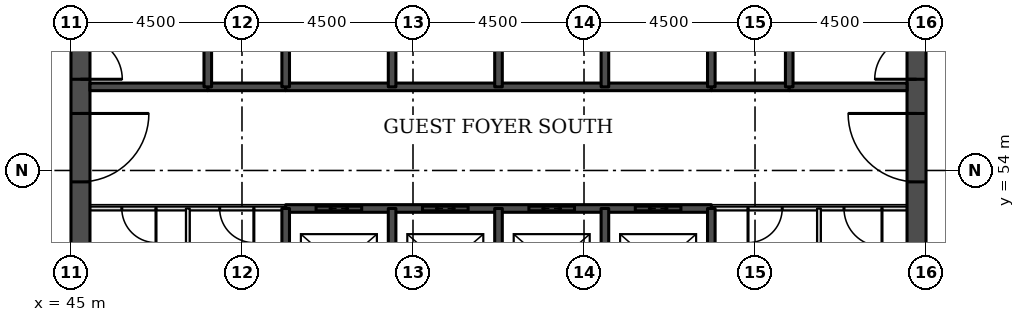
"""IFC4 building model, lengths in metres.
Left out: names, types, materials, properties, quantities, classifications, styles, units other than length and angle.
Written with IfcOpenShell. Run it as: python <this file> out.ifc"""

import sys

from ifc_helpers import new_model, si_unit, direction, frame, frame_2d, origin, place, context, subcontext, project, spatial, rectangle, extrude, element, fill, save


model = new_model("IFC4")
c1 = context("Model", 3, precision=1e-05, world=origin(), true_north=direction((0.0, 1.0)))
c2 = subcontext(c1, "Body", "Model", "MODEL_VIEW")
j1 = project(units=[si_unit("LENGTHUNIT", "METRE"), si_unit("PLANEANGLEUNIT", "RADIAN")], contexts=[c1])
p1 = place(None, origin())
s1 = spatial("IfcSite", under=j1, at=p1, CompositionType="ELEMENT")
p2 = place(p1, origin())
s2 = spatial("IfcBuilding", under=s1, at=p2, CompositionType="ELEMENT")
p3 = place(p2, frame((0.0, 0.0, 66.0)))
s3 = spatial("IfcBuildingStorey", under=s2, at=p3, CompositionType="ELEMENT", Elevation=66.0)
p4 = place(p3, frame((45.25, 49.5, 0.0), z_axis=(0.0, 0.0, 1.0), x_axis=(0.0, 1.0, 0.0)))
e1 = element("IfcWall", 1, at=p4, inside=s3, PredefinedType="SHEAR", context=c2, shape_type="SweptSolid", body=[
    extrude(rectangle(XDim=22.5, YDim=0.5, at=frame_2d((11.25, 0.0))), origin(), (0.0, 0.0, 1.0), 3.3),
])
p5 = place(p4, frame((4.2, 0.0, 0.0)))
e2 = element("IfcOpeningElement", 2, at=p5, cuts=e1, PredefinedType="OPENING", context=c2, shape_type="SweptSolid", body=[
    extrude(rectangle(XDim=1.8, YDim=2.1, at=frame_2d((0.9, 1.05))), frame((0.0, 0.26, 0.0), z_axis=(0.0, -1.0, 0.0), x_axis=(1.0, 0.0, 0.0)), (0.0, 0.0, 1.0), 0.52),
])
p6 = place(p4, frame((6.9, 0.0, 0.0)))
e3 = element("IfcOpeningElement", 3, at=p6, cuts=e1, PredefinedType="OPENING", context=c2, shape_type="SweptSolid", body=[
    extrude(rectangle(XDim=1.1, YDim=2.1, at=frame_2d((0.55, 1.05))), frame((0.0, 0.26, 0.0), z_axis=(0.0, -1.0, 0.0), x_axis=(1.0, 0.0, 0.0)), (0.0, 0.0, 1.0), 0.52),
])
p7 = place(p4, frame((13.6, 0.0, 0.0)))
e4 = element("IfcOpeningElement", 4, at=p7, cuts=e1, PredefinedType="OPENING", context=c2, shape_type="SweptSolid", body=[
    extrude(rectangle(XDim=1.1, YDim=2.1, at=frame_2d((0.55, 1.05))), frame((0.0, 0.26, 0.0), z_axis=(0.0, -1.0, 0.0), x_axis=(1.0, 0.0, 0.0)), (0.0, 0.0, 1.0), 0.52),
])
p8 = place(p4, frame((16.5, 0.0, 0.0)))
e5 = element("IfcOpeningElement", 5, at=p8, cuts=e1, PredefinedType="OPENING", context=c2, shape_type="SweptSolid", body=[
    extrude(rectangle(XDim=1.8, YDim=2.1, at=frame_2d((0.9, 1.05))), frame((0.0, 0.26, 0.0), z_axis=(0.0, -1.0, 0.0), x_axis=(1.0, 0.0, 0.0)), (0.0, 0.0, 1.0), 0.52),
])
p9 = place(p3, frame((67.25, 49.5, 0.0), z_axis=(0.0, 0.0, 1.0), x_axis=(0.0, 1.0, 0.0)))
e6 = element("IfcWall", 6, at=p9, inside=s3, PredefinedType="SHEAR", context=c2, shape_type="SweptSolid", body=[
    extrude(rectangle(XDim=22.5, YDim=0.5, at=frame_2d((11.25, 0.0))), origin(), (0.0, 0.0, 1.0), 3.3),
])
p10 = place(p9, frame((4.2, 0.0, 0.0)))
e7 = element("IfcOpeningElement", 7, at=p10, cuts=e6, PredefinedType="OPENING", context=c2, shape_type="SweptSolid", body=[
    extrude(rectangle(XDim=1.8, YDim=2.1, at=frame_2d((0.9, 1.05))), frame((0.0, 0.26, 0.0), z_axis=(0.0, -1.0, 0.0), x_axis=(1.0, 0.0, 0.0)), (0.0, 0.0, 1.0), 0.52),
])
p11 = place(p9, frame((6.9, 0.0, 0.0)))
e8 = element("IfcOpeningElement", 8, at=p11, cuts=e6, PredefinedType="OPENING", context=c2, shape_type="SweptSolid", body=[
    extrude(rectangle(XDim=1.1, YDim=2.1, at=frame_2d((0.55, 1.05))), frame((0.0, 0.26, 0.0), z_axis=(0.0, -1.0, 0.0), x_axis=(1.0, 0.0, 0.0)), (0.0, 0.0, 1.0), 0.52),
])
p12 = place(p9, frame((13.6, 0.0, 0.0)))
e9 = element("IfcOpeningElement", 9, at=p12, cuts=e6, PredefinedType="OPENING", context=c2, shape_type="SweptSolid", body=[
    extrude(rectangle(XDim=1.1, YDim=2.1, at=frame_2d((0.55, 1.05))), frame((0.0, 0.26, 0.0), z_axis=(0.0, -1.0, 0.0), x_axis=(1.0, 0.0, 0.0)), (0.0, 0.0, 1.0), 0.52),
])
p13 = place(p9, frame((16.5, 0.0, 0.0)))
e10 = element("IfcOpeningElement", 10, at=p13, cuts=e6, PredefinedType="OPENING", context=c2, shape_type="SweptSolid", body=[
    extrude(rectangle(XDim=1.8, YDim=2.1, at=frame_2d((0.9, 1.05))), frame((0.0, 0.26, 0.0), z_axis=(0.0, -1.0, 0.0), x_axis=(1.0, 0.0, 0.0)), (0.0, 0.0, 1.0), 0.52),
])
p14 = place(p3, frame((45.5, 53.0, 0.0), z_axis=(0.0, 0.0, 1.0), x_axis=(1.0, 0.0, 0.0)))
e11 = element("IfcWall", 11, at=p14, inside=s3, PredefinedType="PARTITIONING", context=c2, shape_type="SweptSolid", body=[
    extrude(rectangle(XDim=5.15, YDim=0.1, at=frame_2d((2.575, 0.0))), origin(), (0.0, 0.0, 1.0), 3.08),
])
p15 = place(p14, frame((0.837, 0.0, 0.0)))
e12 = element("IfcOpeningElement", 12, at=p15, cuts=e11, PredefinedType="OPENING", context=c2, shape_type="SweptSolid", body=[
    extrude(rectangle(XDim=0.9, YDim=2.1, at=frame_2d((0.45, 1.05))), frame((0.0, 0.06, 0.0), z_axis=(0.0, -1.0, 0.0), x_axis=(1.0, 0.0, 0.0)), (0.0, 0.0, 1.0), 0.12),
])
p16 = place(p14, frame((3.413, 0.0, 0.0)))
e13 = element("IfcOpeningElement", 13, at=p16, cuts=e11, PredefinedType="OPENING", context=c2, shape_type="SweptSolid", body=[
    extrude(rectangle(XDim=0.9, YDim=2.1, at=frame_2d((0.45, 1.05))), frame((0.0, 0.06, 0.0), z_axis=(0.0, -1.0, 0.0), x_axis=(1.0, 0.0, 0.0)), (0.0, 0.0, 1.0), 0.12),
])
p17 = place(p3, frame((61.85, 53.0, 0.0), z_axis=(0.0, 0.0, 1.0), x_axis=(1.0, 0.0, 0.0)))
e14 = element("IfcWall", 14, at=p17, inside=s3, PredefinedType="PARTITIONING", context=c2, shape_type="SweptSolid", body=[
    extrude(rectangle(XDim=5.15, YDim=0.1, at=frame_2d((2.575, 0.0))), origin(), (0.0, 0.0, 1.0), 3.08),
])
p18 = place(p17, frame((3.491, 0.0, 0.0)))
e15 = element("IfcOpeningElement", 15, at=p18, cuts=e14, PredefinedType="OPENING", context=c2, shape_type="SweptSolid", body=[
    extrude(rectangle(XDim=1.0, YDim=2.1, at=frame_2d((0.5, 1.05))), frame((0.0, 0.06, 0.0), z_axis=(0.0, -1.0, 0.0), x_axis=(1.0, 0.0, 0.0)), (0.0, 0.0, 1.0), 0.12),
])
p19 = place(p17, frame((0.966, 0.0, 0.0)))
e16 = element("IfcOpeningElement", 16, at=p19, cuts=e14, PredefinedType="OPENING", context=c2, shape_type="SweptSolid", body=[
    extrude(rectangle(XDim=0.9, YDim=2.1, at=frame_2d((0.45, 1.05))), frame((0.0, 0.06, 0.0), z_axis=(0.0, -1.0, 0.0), x_axis=(1.0, 0.0, 0.0)), (0.0, 0.0, 1.0), 0.12),
])
p20 = place(p3, frame((50.65, 53.0, 0.0), z_axis=(0.0, 0.0, 1.0), x_axis=(1.0, 0.0, 0.0)))
e17 = element("IfcWall", 17, at=p20, inside=s3, PredefinedType="SOLIDWALL", context=c2, shape_type="SweptSolid", body=[
    extrude(rectangle(XDim=11.2, YDim=0.2, at=frame_2d((5.6, 0.0))), origin(), (0.0, 0.0, 1.0), 3.08),
])
p21 = place(p20, frame((0.8, 0.0, 0.0)))
e18 = element("IfcOpeningElement", 18, at=p21, cuts=e17, PredefinedType="OPENING", context=c2, shape_type="SweptSolid", body=[
    extrude(rectangle(XDim=1.2, YDim=2.1, at=frame_2d((0.6, 1.05))), frame((0.0, 0.11, 0.0), z_axis=(0.0, -1.0, 0.0), x_axis=(1.0, 0.0, 0.0)), (0.0, 0.0, 1.0), 0.22),
])
p22 = place(p20, frame((3.6, 0.0, 0.0)))
e19 = element("IfcOpeningElement", 19, at=p22, cuts=e17, PredefinedType="OPENING", context=c2, shape_type="SweptSolid", body=[
    extrude(rectangle(XDim=1.2, YDim=2.1, at=frame_2d((0.6, 1.05))), frame((0.0, 0.11, 0.0), z_axis=(0.0, -1.0, 0.0), x_axis=(1.0, 0.0, 0.0)), (0.0, 0.0, 1.0), 0.22),
])
p23 = place(p20, frame((6.4, 0.0, 0.0)))
e20 = element("IfcOpeningElement", 20, at=p23, cuts=e17, PredefinedType="OPENING", context=c2, shape_type="SweptSolid", body=[
    extrude(rectangle(XDim=1.2, YDim=2.1, at=frame_2d((0.6, 1.05))), frame((0.0, 0.11, 0.0), z_axis=(0.0, -1.0, 0.0), x_axis=(1.0, 0.0, 0.0)), (0.0, 0.0, 1.0), 0.22),
])
p24 = place(p20, frame((9.2, 0.0, 0.0)))
e21 = element("IfcOpeningElement", 21, at=p24, cuts=e17, PredefinedType="OPENING", context=c2, shape_type="SweptSolid", body=[
    extrude(rectangle(XDim=1.2, YDim=2.1, at=frame_2d((0.6, 1.05))), frame((0.0, 0.11, 0.0), z_axis=(0.0, -1.0, 0.0), x_axis=(1.0, 0.0, 0.0)), (0.0, 0.0, 1.0), 0.22),
])
for number, where, z_axis, x_axis in (
    (22, (48.6, 56.2, 0.0), (0.0, 0.0, 1.0), (1.0, 0.0, 0.0)),
    (23, (61.85, 56.2, 0.0), (0.0, 0.0, 1.0), (1.0, 0.0, 0.0)),
):
    element("IfcWall", number, at=place(p3, frame(where, z_axis=z_axis, x_axis=x_axis)), inside=s3, PredefinedType="SOLIDWALL", context=c2, shape_type="SweptSolid", body=[
        extrude(rectangle(XDim=2.05, YDim=0.2, at=frame_2d((1.025, 0.0))), origin(), (0.0, 0.0, 1.0), 3.08),
    ])
p25 = place(p3, frame((45.5, 56.2, 0.0), z_axis=(0.0, 0.0, 1.0), x_axis=(1.0, 0.0, 0.0)))
e24 = element("IfcWall", 24, at=p25, inside=s3, PredefinedType="SOLIDWALL", context=c2, shape_type="SweptSolid", body=[
    extrude(rectangle(XDim=3.1, YDim=0.2, at=frame_2d((1.55, 0.0))), origin(), (0.0, 0.0, 1.0), 3.08),
])
p26 = place(p3, frame((50.65, 56.2, 0.0), z_axis=(0.0, 0.0, 1.0), x_axis=(1.0, 0.0, 0.0)))
e25 = element("IfcWall", 25, at=p26, inside=s3, PredefinedType="SOLIDWALL", context=c2, shape_type="SweptSolid", body=[
    extrude(rectangle(XDim=11.2, YDim=0.2, at=frame_2d((5.6, 0.0))), origin(), (0.0, 0.0, 1.0), 3.08),
])
p27 = place(p3, frame((63.9, 56.2, 0.0), z_axis=(0.0, 0.0, 1.0), x_axis=(1.0, 0.0, 0.0)))
e26 = element("IfcWall", 26, at=p27, inside=s3, PredefinedType="SOLIDWALL", context=c2, shape_type="SweptSolid", body=[
    extrude(rectangle(XDim=3.1, YDim=0.2, at=frame_2d((1.55, 0.0))), origin(), (0.0, 0.0, 1.0), 3.08),
])
p28 = place(p3, frame((48.075, 50.0, 0.0), z_axis=(0.0, 0.0, 1.0), x_axis=(0.0, 1.0, 0.0)))
e27 = element("IfcWall", 27, at=p28, inside=s3, PredefinedType="PARTITIONING", context=c2, shape_type="SweptSolid", body=[
    extrude(rectangle(XDim=3.0, YDim=0.1, at=frame_2d((1.5, 0.0))), origin(), (0.0, 0.0, 1.0), 3.08),
])
p29 = place(p3, frame((48.6, 56.2, 0.0), z_axis=(0.0, 0.0, 1.0), x_axis=(0.0, 1.0, 0.0)))
e28 = element("IfcWall", 28, at=p29, inside=s3, PredefinedType="SOLIDWALL", context=c2, shape_type="SweptSolid", body=[
    extrude(rectangle(XDim=5.8, YDim=0.2, at=frame_2d((2.9, 0.0))), origin(), (0.0, 0.0, 1.0), 3.08),
])
p30 = place(p3, frame((50.65, 50.0, 0.0), z_axis=(0.0, 0.0, 1.0), x_axis=(0.0, 1.0, 0.0)))
e29 = element("IfcWall", 29, at=p30, inside=s3, PredefinedType="SOLIDWALL", context=c2, shape_type="SweptSolid", body=[
    extrude(rectangle(XDim=3.0, YDim=0.2, at=frame_2d((1.5, 0.0))), origin(), (0.0, 0.0, 1.0), 3.08),
])
p31 = place(p3, frame((50.65, 56.2, 0.0), z_axis=(0.0, 0.0, 1.0), x_axis=(0.0, 1.0, 0.0)))
e30 = element("IfcWall", 30, at=p31, inside=s3, PredefinedType="SOLIDWALL", context=c2, shape_type="SweptSolid", body=[
    extrude(rectangle(XDim=2.8, YDim=0.2, at=frame_2d((1.4, 0.0))), origin(), (0.0, 0.0, 1.0), 3.08),
])
p32 = place(p3, frame((53.45, 50.0, 0.0), z_axis=(0.0, 0.0, 1.0), x_axis=(0.0, 1.0, 0.0)))
e31 = element("IfcWall", 31, at=p32, inside=s3, PredefinedType="SOLIDWALL", context=c2, shape_type="SweptSolid", body=[
    extrude(rectangle(XDim=3.0, YDim=0.2, at=frame_2d((1.5, 0.0))), origin(), (0.0, 0.0, 1.0), 3.08),
])
p33 = place(p3, frame((53.45, 56.2, 0.0), z_axis=(0.0, 0.0, 1.0), x_axis=(0.0, 1.0, 0.0)))
e32 = element("IfcWall", 32, at=p33, inside=s3, PredefinedType="SOLIDWALL", context=c2, shape_type="SweptSolid", body=[
    extrude(rectangle(XDim=2.8, YDim=0.2, at=frame_2d((1.4, 0.0))), origin(), (0.0, 0.0, 1.0), 3.08),
])
p34 = place(p3, frame((56.25, 50.0, 0.0), z_axis=(0.0, 0.0, 1.0), x_axis=(0.0, 1.0, 0.0)))
e33 = element("IfcWall", 33, at=p34, inside=s3, PredefinedType="SOLIDWALL", context=c2, shape_type="SweptSolid", body=[
    extrude(rectangle(XDim=3.0, YDim=0.2, at=frame_2d((1.5, 0.0))), origin(), (0.0, 0.0, 1.0), 3.08),
])
p35 = place(p3, frame((56.25, 56.2, 0.0), z_axis=(0.0, 0.0, 1.0), x_axis=(0.0, 1.0, 0.0)))
e34 = element("IfcWall", 34, at=p35, inside=s3, PredefinedType="SOLIDWALL", context=c2, shape_type="SweptSolid", body=[
    extrude(rectangle(XDim=2.8, YDim=0.2, at=frame_2d((1.4, 0.0))), origin(), (0.0, 0.0, 1.0), 3.08),
])
p36 = place(p3, frame((59.05, 50.0, 0.0), z_axis=(0.0, 0.0, 1.0), x_axis=(0.0, 1.0, 0.0)))
e35 = element("IfcWall", 35, at=p36, inside=s3, PredefinedType="SOLIDWALL", context=c2, shape_type="SweptSolid", body=[
    extrude(rectangle(XDim=3.0, YDim=0.2, at=frame_2d((1.5, 0.0))), origin(), (0.0, 0.0, 1.0), 3.08),
])
p37 = place(p3, frame((59.05, 56.2, 0.0), z_axis=(0.0, 0.0, 1.0), x_axis=(0.0, 1.0, 0.0)))
e36 = element("IfcWall", 36, at=p37, inside=s3, PredefinedType="SOLIDWALL", context=c2, shape_type="SweptSolid", body=[
    extrude(rectangle(XDim=2.8, YDim=0.2, at=frame_2d((1.4, 0.0))), origin(), (0.0, 0.0, 1.0), 3.08),
])
p38 = place(p3, frame((61.85, 50.0, 0.0), z_axis=(0.0, 0.0, 1.0), x_axis=(0.0, 1.0, 0.0)))
e37 = element("IfcWall", 37, at=p38, inside=s3, PredefinedType="SOLIDWALL", context=c2, shape_type="SweptSolid", body=[
    extrude(rectangle(XDim=3.0, YDim=0.2, at=frame_2d((1.5, 0.0))), origin(), (0.0, 0.0, 1.0), 3.08),
])
p39 = place(p3, frame((61.85, 56.2, 0.0), z_axis=(0.0, 0.0, 1.0), x_axis=(0.0, 1.0, 0.0)))
e38 = element("IfcWall", 38, at=p39, inside=s3, PredefinedType="SOLIDWALL", context=c2, shape_type="SweptSolid", body=[
    extrude(rectangle(XDim=2.8, YDim=0.2, at=frame_2d((1.4, 0.0))), origin(), (0.0, 0.0, 1.0), 3.08),
])
p40 = place(p3, frame((63.9, 56.2, 0.0), z_axis=(0.0, 0.0, 1.0), x_axis=(0.0, 1.0, 0.0)))
e39 = element("IfcWall", 39, at=p40, inside=s3, PredefinedType="SOLIDWALL", context=c2, shape_type="SweptSolid", body=[
    extrude(rectangle(XDim=5.8, YDim=0.2, at=frame_2d((2.9, 0.0))), origin(), (0.0, 0.0, 1.0), 3.08),
])
p41 = place(p3, frame((64.683, 50.0, 0.0), z_axis=(0.0, 0.0, 1.0), x_axis=(0.0, 1.0, 0.0)))
e40 = element("IfcWall", 40, at=p41, inside=s3, PredefinedType="PARTITIONING", context=c2, shape_type="SweptSolid", body=[
    extrude(rectangle(XDim=3.0, YDim=0.1, at=frame_2d((1.5, 0.0))), origin(), (0.0, 0.0, 1.0), 3.08),
])
p42 = place(p21, origin())
e41 = element("IfcDoor", 41, at=p42, inside=s3, OperationType="DOUBLE_DOOR_SLIDING", PredefinedType="DOOR", context=c2, shape_type="SweptSolid", body=[
    extrude(rectangle(XDim=1.2, YDim=2.1, at=frame_2d((0.6, 1.05))), frame((0.0, 0.025, 0.0), z_axis=(0.0, -1.0, 0.0), x_axis=(1.0, 0.0, 0.0)), (0.0, 0.0, 1.0), 0.05),
])
fill(e18, e41)
p43 = place(p22, origin())
e42 = element("IfcDoor", 42, at=p43, inside=s3, OperationType="DOUBLE_DOOR_SLIDING", PredefinedType="DOOR", context=c2, shape_type="SweptSolid", body=[
    extrude(rectangle(XDim=1.2, YDim=2.1, at=frame_2d((0.6, 1.05))), frame((0.0, 0.025, 0.0), z_axis=(0.0, -1.0, 0.0), x_axis=(1.0, 0.0, 0.0)), (0.0, 0.0, 1.0), 0.05),
])
fill(e19, e42)
p44 = place(p23, origin())
e43 = element("IfcDoor", 43, at=p44, inside=s3, OperationType="DOUBLE_DOOR_SLIDING", PredefinedType="DOOR", context=c2, shape_type="SweptSolid", body=[
    extrude(rectangle(XDim=1.2, YDim=2.1, at=frame_2d((0.6, 1.05))), frame((0.0, 0.025, 0.0), z_axis=(0.0, -1.0, 0.0), x_axis=(1.0, 0.0, 0.0)), (0.0, 0.0, 1.0), 0.05),
])
fill(e20, e43)
p45 = place(p24, origin())
e44 = element("IfcDoor", 44, at=p45, inside=s3, OperationType="DOUBLE_DOOR_SLIDING", PredefinedType="DOOR", context=c2, shape_type="SweptSolid", body=[
    extrude(rectangle(XDim=1.2, YDim=2.1, at=frame_2d((0.6, 1.05))), frame((0.0, 0.025, 0.0), z_axis=(0.0, -1.0, 0.0), x_axis=(1.0, 0.0, 0.0)), (0.0, 0.0, 1.0), 0.05),
])
fill(e21, e44)
p46 = place(p5, frame((1.8, 0.0, 0.0), z_axis=(0.0, 0.0, 1.0), x_axis=(-1.0, 0.0, 0.0)))
e45 = element("IfcDoor", 45, at=p46, inside=s3, OperationType="SINGLE_SWING_LEFT", PredefinedType="DOOR", context=c2, shape_type="SweptSolid", body=[
    extrude(rectangle(XDim=1.8, YDim=2.1, at=frame_2d((0.9, 1.05))), frame((0.0, 0.025, 0.0), z_axis=(0.0, -1.0, 0.0), x_axis=(1.0, 0.0, 0.0)), (0.0, 0.0, 1.0), 0.05),
])
fill(e2, e45)
p47 = place(p6, frame((1.1, 0.0, 0.0), z_axis=(0.0, 0.0, 1.0), x_axis=(-1.0, 0.0, 0.0)))
e46 = element("IfcDoor", 46, at=p47, inside=s3, OperationType="SINGLE_SWING_RIGHT", PredefinedType="DOOR", context=c2, shape_type="SweptSolid", body=[
    extrude(rectangle(XDim=1.1, YDim=2.1, at=frame_2d((0.55, 1.05))), frame((0.0, 0.025, 0.0), z_axis=(0.0, -1.0, 0.0), x_axis=(1.0, 0.0, 0.0)), (0.0, 0.0, 1.0), 0.05),
])
fill(e3, e46)
p48 = place(p10, origin())
e47 = element("IfcDoor", 47, at=p48, inside=s3, OperationType="SINGLE_SWING_RIGHT", PredefinedType="DOOR", context=c2, shape_type="SweptSolid", body=[
    extrude(rectangle(XDim=1.8, YDim=2.1, at=frame_2d((0.9, 1.05))), frame((0.0, 0.025, 0.0), z_axis=(0.0, -1.0, 0.0), x_axis=(1.0, 0.0, 0.0)), (0.0, 0.0, 1.0), 0.05),
])
fill(e7, e47)
p49 = place(p11, origin())
e48 = element("IfcDoor", 48, at=p49, inside=s3, OperationType="SINGLE_SWING_LEFT", PredefinedType="DOOR", context=c2, shape_type="SweptSolid", body=[
    extrude(rectangle(XDim=1.1, YDim=2.1, at=frame_2d((0.55, 1.05))), frame((0.0, 0.025, 0.0), z_axis=(0.0, -1.0, 0.0), x_axis=(1.0, 0.0, 0.0)), (0.0, 0.0, 1.0), 0.05),
])
fill(e8, e48)
p50 = place(p18, frame((1.0, 0.0, 0.0), z_axis=(0.0, 0.0, 1.0), x_axis=(-1.0, 0.0, 0.0)))
e49 = element("IfcDoor", 49, at=p50, inside=s3, OperationType="SINGLE_SWING_LEFT", PredefinedType="DOOR", context=c2, shape_type="SweptSolid", body=[
    extrude(rectangle(XDim=1.0, YDim=2.1, at=frame_2d((0.5, 1.05))), frame((0.0, 0.025, 0.0), z_axis=(0.0, -1.0, 0.0), x_axis=(1.0, 0.0, 0.0)), (0.0, 0.0, 1.0), 0.05),
])
fill(e15, e49)
p51 = place(p19, frame((0.9, 0.0, 0.0), z_axis=(0.0, 0.0, 1.0), x_axis=(-1.0, 0.0, 0.0)))
e50 = element("IfcDoor", 50, at=p51, inside=s3, OperationType="SINGLE_SWING_RIGHT", PredefinedType="DOOR", context=c2, shape_type="SweptSolid", body=[
    extrude(rectangle(XDim=0.9, YDim=2.1, at=frame_2d((0.45, 1.05))), frame((0.0, 0.025, 0.0), z_axis=(0.0, -1.0, 0.0), x_axis=(1.0, 0.0, 0.0)), (0.0, 0.0, 1.0), 0.05),
])
fill(e16, e50)
p52 = place(p15, frame((0.9, 0.0, 0.0), z_axis=(0.0, 0.0, 1.0), x_axis=(-1.0, 0.0, 0.0)))
e51 = element("IfcDoor", 51, at=p52, inside=s3, OperationType="SINGLE_SWING_LEFT", PredefinedType="DOOR", context=c2, shape_type="SweptSolid", body=[
    extrude(rectangle(XDim=0.9, YDim=2.1, at=frame_2d((0.45, 1.05))), frame((0.0, 0.025, 0.0), z_axis=(0.0, -1.0, 0.0), x_axis=(1.0, 0.0, 0.0)), (0.0, 0.0, 1.0), 0.05),
])
fill(e12, e51)
p53 = place(p16, frame((0.9, 0.0, 0.0), z_axis=(0.0, 0.0, 1.0), x_axis=(-1.0, 0.0, 0.0)))
e52 = element("IfcDoor", 52, at=p53, inside=s3, OperationType="SINGLE_SWING_LEFT", PredefinedType="DOOR", context=c2, shape_type="SweptSolid", body=[
    extrude(rectangle(XDim=0.9, YDim=2.1, at=frame_2d((0.45, 1.05))), frame((0.0, 0.025, 0.0), z_axis=(0.0, -1.0, 0.0), x_axis=(1.0, 0.0, 0.0)), (0.0, 0.0, 1.0), 0.05),
])
fill(e13, e52)
save(model, sys.argv[1])
